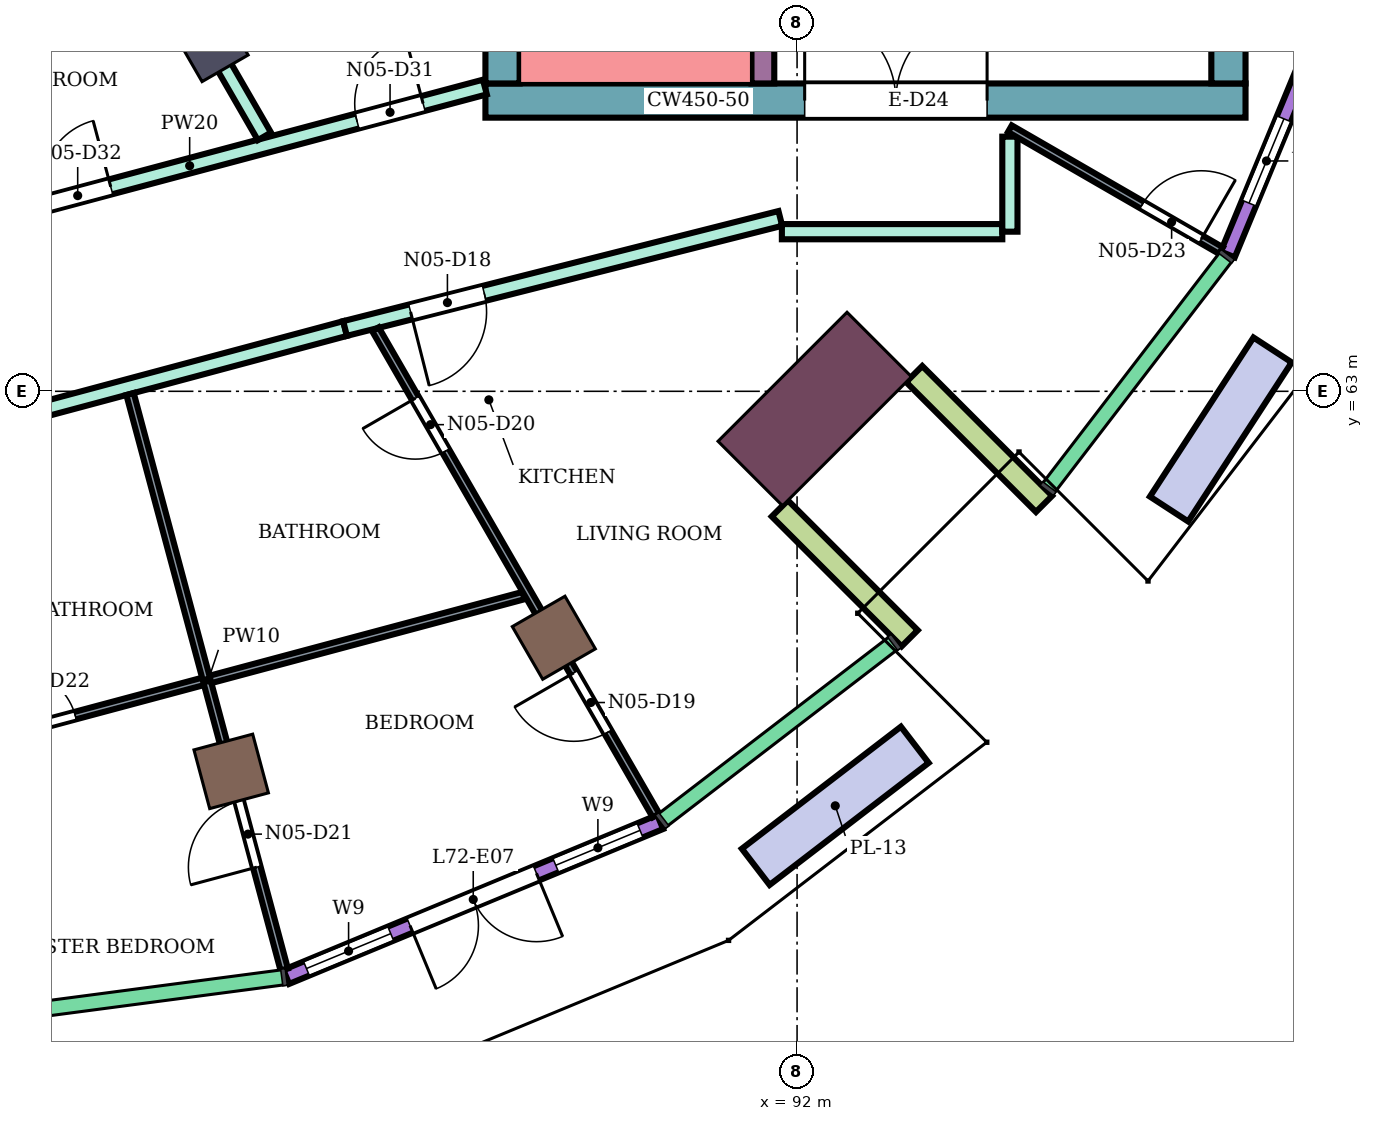
"""IFC4 building model, lengths in metres.
Left out: names, types, materials, properties, quantities, classifications, styles, units other than length and angle.
Written with IfcOpenShell. Run it as: python <this file> out.ifc"""

import sys

from ifc_helpers import new_model, si_unit, direction, frame, frame_2d, origin, origin_2d, place, context, subcontext, project, spatial, rectangle, extrude, element, fill, save


model = new_model("IFC4")
c1 = context("Model", 3, precision=1e-05, world=origin(), true_north=direction((0.0, 1.0)))
c2 = subcontext(c1, "Body", "Model", "MODEL_VIEW")
j1 = project(units=[si_unit("LENGTHUNIT", "METRE"), si_unit("PLANEANGLEUNIT", "RADIAN")], contexts=[c1])
p1 = place(None, origin())
s1 = spatial("IfcSite", under=j1, at=p1, CompositionType="ELEMENT")
p2 = place(p1, origin())
s2 = spatial("IfcBuilding", under=s1, at=p2, CompositionType="ELEMENT")
p3 = place(p2, frame((0.0, 0.0, 314.9)))
s3 = spatial("IfcBuildingStorey", under=s2, at=p3, CompositionType="ELEMENT", Elevation=314.9)
for number, where, z_axis, x_axis in (
    (1, (84.555, 58.0, 0.0), (0.0, 0.0, 1.0), (0.259, -0.966, 0.0)),
    (2, (88.8, 59.758, 0.0), (0.0, 0.0, 1.0), (0.5, -0.866, 0.0)),
):
    element("IfcColumn", number, at=place(p3, frame(where, z_axis=z_axis, x_axis=x_axis)), inside=s3, PredefinedType="COLUMN", context=c2, shape_type="SweptSolid", body=[
        extrude(rectangle(XDim=0.8, YDim=0.8, at=origin_2d()), origin(), (0.0, 0.0, 1.0), 4.4),
    ])
p4 = place(p3, frame((84.3, 67.552, 0.0), z_axis=(0.0, 0.0, 1.0), x_axis=(0.5, -0.866025403784, 0.0)))
e3 = element("IfcColumn", 3, at=p4, inside=s3, PredefinedType="COLUMN", context=c2, shape_type="SweptSolid", body=[
    extrude(rectangle(XDim=0.7, YDim=0.7, at=origin_2d()), origin(), (0.0, 0.0, 1.0), 4.4),
])
p5 = place(p3, frame((92.233, 62.767, 0.0), z_axis=(0.0, 0.0, 1.0), x_axis=(0.707106781187, -0.707106781187, 0.0)))
e4 = element("IfcColumn", 4, at=p5, inside=s3, PredefinedType="COLUMN", context=c2, shape_type="SweptSolid", body=[
    extrude(rectangle(XDim=1.2, YDim=2.4, at=origin_2d()), origin(), (0.0, 0.0, 1.0), 4.4),
])
p6 = place(p3, frame((87.9, 66.825, 0.0), z_axis=(0.0, 0.0, 1.0), x_axis=(1.0, 0.0, 0.0)))
e5 = element("IfcWall", 5, at=p6, inside=s3, PredefinedType="SHEAR", context=c2, shape_type="SweptSolid", body=[
    extrude(rectangle(XDim=10.0, YDim=0.45, at=frame_2d((5.0, 0.0))), origin(), (0.0, 0.0, 1.0), 4.08),
])
p7 = place(p6, frame((4.2, 0.0, 0.0)))
e6 = element("IfcOpeningElement", 6, at=p7, cuts=e5, PredefinedType="OPENING", context=c2, shape_type="SweptSolid", body=[
    extrude(rectangle(XDim=2.4, YDim=2.4, at=frame_2d((1.2, 1.2))), frame((0.0, 0.235, 0.0), z_axis=(0.0, -1.0, 0.0), x_axis=(1.0, 0.0, 0.0)), (0.0, 0.0, 1.0), 0.47),
])
p8 = place(p3, frame((88.125, 67.05, 0.0), z_axis=(0.0, 0.0, 1.0), x_axis=(0.0, 1.0, 0.0)))
e7 = element("IfcWall", 7, at=p8, inside=s3, PredefinedType="SHEAR", context=c2, shape_type="SweptSolid", body=[
    extrude(rectangle(XDim=7.95, YDim=0.45, at=frame_2d((3.975, 0.0))), origin(), (0.0, 0.0, 1.0), 4.08),
])
p9 = place(p3, frame((97.675, 67.05, 0.0), z_axis=(0.0, 0.0, 1.0), x_axis=(0.0, 1.0, 0.0)))
e8 = element("IfcWall", 8, at=p9, inside=s3, PredefinedType="SHEAR", context=c2, shape_type="SweptSolid", body=[
    extrude(rectangle(XDim=3.7, YDim=0.45, at=frame_2d((1.85, 0.0))), origin(), (0.0, 0.0, 1.0), 4.08),
])
p10 = place(p3, frame((91.55, 67.05, 0.0), z_axis=(0.0, 0.0, 1.0), x_axis=(0.0, 1.0, 0.0)))
e9 = element("IfcWall", 9, at=p10, inside=s3, PredefinedType="SHEAR", context=c2, shape_type="SweptSolid", body=[
    extrude(rectangle(XDim=7.95, YDim=0.3, at=frame_2d((3.975, 0.0))), origin(), (0.0, 0.0, 1.0), 4.08),
])
p11 = place(p10, frame((0.6, 0.0, 0.0)))
e10 = element("IfcOpeningElement", 10, at=p11, cuts=e9, PredefinedType="OPENING", context=c2, shape_type="SweptSolid", body=[
    extrude(rectangle(XDim=0.9, YDim=2.1, at=frame_2d((0.45, 1.05))), frame((0.0, 0.16, 0.0), z_axis=(0.0, -1.0, 0.0), x_axis=(1.0, 0.0, 0.0)), (0.0, 0.0, 1.0), 0.32),
])
p12 = place(p3, frame((85.28, 55.296, 0.0), z_axis=(0.0, 0.0, 1.0), x_axis=(0.923876574156, 0.382690574388, 0.0)))
e11 = element("IfcWall", 11, at=p12, inside=s3, PredefinedType="NOTDEFINED", context=c2, shape_type="SweptSolid", body=[
    extrude(rectangle(XDim=5.325, YDim=0.2, at=frame_2d((2.663, 0.0))), origin(), (0.0, 0.0, 1.0), 4.4),
])
p13 = place(p12, frame((0.288, 0.0, 0.9)))
e12 = element("IfcOpeningElement", 12, at=p13, cuts=e11, PredefinedType="OPENING", context=c2, shape_type="SweptSolid", body=[
    extrude(rectangle(XDim=1.2, YDim=2.7, at=frame_2d((0.6, 1.35))), frame((0.0, 0.11, 0.0), z_axis=(0.0, -1.0, 0.0), x_axis=(1.0, 0.0, 0.0)), (0.0, 0.0, 1.0), 0.22),
])
p14 = place(p12, frame((1.763, 0.0, 0.0)))
e13 = element("IfcOpeningElement", 13, at=p14, cuts=e11, PredefinedType="OPENING", context=c2, shape_type="SweptSolid", body=[
    extrude(rectangle(XDim=1.8, YDim=2.7, at=frame_2d((0.9, 1.35))), frame((0.0, 0.11, 0.0), z_axis=(0.0, -1.0, 0.0), x_axis=(1.0, 0.0, 0.0)), (0.0, 0.0, 1.0), 0.22),
])
p15 = place(p12, frame((3.838, 0.0, 0.9)))
e14 = element("IfcOpeningElement", 14, at=p15, cuts=e11, PredefinedType="OPENING", context=c2, shape_type="SweptSolid", body=[
    extrude(rectangle(XDim=1.2, YDim=2.7, at=frame_2d((0.6, 1.35))), frame((0.0, 0.11, 0.0), z_axis=(0.0, -1.0, 0.0), x_axis=(1.0, 0.0, 0.0)), (0.0, 0.0, 1.0), 0.22),
])
p16 = place(p3, frame((97.666, 64.801, 0.0), z_axis=(0.0, 0.0, 1.0), x_axis=(0.382690574388, 0.923876574156, 0.0)))
e15 = element("IfcWall", 15, at=p16, inside=s3, PredefinedType="NOTDEFINED", context=c2, shape_type="SweptSolid", body=[
    extrude(rectangle(XDim=5.325, YDim=0.2, at=frame_2d((2.663, 0.0))), origin(), (0.0, 0.0, 1.0), 4.4),
])
p17 = place(p16, frame((0.731, 0.0, 0.9)))
e16 = element("IfcOpeningElement", 16, at=p17, cuts=e15, PredefinedType="OPENING", context=c2, shape_type="SweptSolid", body=[
    extrude(rectangle(XDim=1.2, YDim=2.7, at=frame_2d((0.6, 1.35))), frame((0.0, 0.11, 0.0), z_axis=(0.0, -1.0, 0.0), x_axis=(1.0, 0.0, 0.0)), (0.0, 0.0, 1.0), 0.22),
])
p18 = place(p16, frame((3.394, 0.0, 0.9)))
e17 = element("IfcOpeningElement", 17, at=p18, cuts=e15, PredefinedType="OPENING", context=c2, shape_type="SweptSolid", body=[
    extrude(rectangle(XDim=1.2, YDim=2.7, at=frame_2d((0.6, 1.35))), frame((0.0, 0.11, 0.0), z_axis=(0.0, -1.0, 0.0), x_axis=(1.0, 0.0, 0.0)), (0.0, 0.0, 1.0), 0.22),
])
for number, where, z_axis, x_axis in (
    (18, (91.773, 61.459, 0.0), (0.0, 0.0, 1.0), (0.707, -0.707, 0.0)),
    (19, (93.541, 63.227, 0.0), (0.0, 0.0, 1.0), (0.707, -0.707, 0.0)),
):
    element("IfcWall", number, at=place(p3, frame(where, z_axis=z_axis, x_axis=x_axis)), inside=s3, PredefinedType="NOTDEFINED", context=c2, shape_type="SweptSolid", body=[
        extrude(rectangle(XDim=2.416, YDim=0.3, at=frame_2d((1.208, 0.0))), origin(), (0.0, 0.0, 1.0), 4.4),
    ])
p19 = place(p3, frame((80.0, 67.396, 0.0), z_axis=(0.0, 0.0, 1.0), x_axis=(0.965933654434, 0.258789828301, 0.0)))
e20 = element("IfcWall", 20, at=p19, inside=s3, PredefinedType="NOTDEFINED", context=c2, shape_type="SweptSolid", body=[
    extrude(rectangle(XDim=3.936, YDim=0.2, at=frame_2d((1.968, 0.0))), origin(), (0.0, 0.0, 1.0), 4.4),
])
p20 = place(p19, frame((0.468, 0.0, 0.9)))
e21 = element("IfcOpeningElement", 21, at=p20, cuts=e20, PredefinedType="OPENING", context=c2, shape_type="SweptSolid", body=[
    extrude(rectangle(XDim=3.0, YDim=2.3, at=frame_2d((1.5, 1.15))), frame((0.0, 0.11, 0.0), z_axis=(0.0, -1.0, 0.0), x_axis=(1.0, 0.0, 0.0)), (0.0, 0.0, 1.0), 0.22),
])
p21 = place(p3, frame((91.456, 56.744, 0.0), z_axis=(0.0, 0.0, 1.0), x_axis=(0.793376894156, 0.608730731785, 0.0)))
e22 = element("IfcWall", 22, at=p21, inside=s3, PredefinedType="USERDEFINED", context=c2, shape_type="SweptSolid", body=[
    extrude(rectangle(XDim=2.638, YDim=0.6, at=frame_2d((1.319, 0.0))), origin(), (0.0, 0.0, 1.0), 0.6),
])
p22 = place(p3, frame((96.894, 61.451, 0.0), z_axis=(0.0, 0.0, 1.0), x_axis=(0.545551817612, 0.838077093292, 0.0)))
e23 = element("IfcWall", 23, at=p22, inside=s3, PredefinedType="USERDEFINED", context=c2, shape_type="SweptSolid", body=[
    extrude(rectangle(XDim=2.497, YDim=0.6, at=frame_2d((1.249, 0.0))), origin(), (0.0, 0.0, 1.0), 0.6),
])
p23 = place(p3, frame((80.125, 64.932, 0.0), z_axis=(0.0, 0.0, 1.0), x_axis=(0.966236955806, 0.257655089674, 0.0)))
e24 = element("IfcWall", 24, at=p23, inside=s3, PredefinedType="PARTITIONING", context=c2, shape_type="SweptSolid", body=[
    extrude(rectangle(XDim=8.039, YDim=0.2, at=frame_2d((4.02, 0.0))), origin(), (0.0, 0.0, 1.0), 3.95),
])
p24 = place(p23, frame((6.298, 0.0, 0.0)))
e25 = element("IfcOpeningElement", 25, at=p24, cuts=e24, PredefinedType="OPENING", context=c2, shape_type="SweptSolid", body=[
    extrude(rectangle(XDim=0.9, YDim=2.1, at=frame_2d((0.45, 1.05))), frame((0.0, 0.11, 0.0), z_axis=(0.0, -1.0, 0.0), x_axis=(1.0, 0.0, 0.0)), (0.0, 0.0, 1.0), 0.22),
])
p25 = place(p23, frame((2.045, 0.0, 0.0)))
e26 = element("IfcOpeningElement", 26, at=p25, cuts=e24, PredefinedType="OPENING", context=c2, shape_type="SweptSolid", body=[
    extrude(rectangle(XDim=0.9, YDim=2.1, at=frame_2d((0.45, 1.05))), frame((0.0, 0.11, 0.0), z_axis=(0.0, -1.0, 0.0), x_axis=(1.0, 0.0, 0.0)), (0.0, 0.0, 1.0), 0.22),
])
p26 = place(p3, frame((80.0, 62.204, 0.0), z_axis=(0.0, 0.0, 1.0), x_axis=(0.965938139786, 0.258773086132, 0.0)))
e27 = element("IfcWall", 27, at=p26, inside=s3, PredefinedType="PARTITIONING", context=c2, shape_type="SweptSolid", body=[
    extrude(rectangle(XDim=6.266, YDim=0.2, at=frame_2d((3.133, 0.0))), origin(), (0.0, 0.0, 1.0), 3.95),
])
p27 = place(p3, frame((83.85, 68.333, 0.0), z_axis=(0.0, 0.0, 1.0), x_axis=(0.500080019051, -0.865979199835, 0.0)))
e28 = element("IfcWall", 28, at=p27, inside=s3, PredefinedType="PARTITIONING", context=c2, shape_type="SweptSolid", body=[
    extrude(rectangle(XDim=2.285, YDim=0.2, at=frame_2d((1.143, 0.0))), origin(), (0.0, 0.0, 1.0), 3.95),
])
p28 = place(p3, frame((86.053, 63.826, 0.0), z_axis=(0.0, 0.0, 1.0), x_axis=(0.969480070232, 0.245170131586, 0.0)))
e29 = element("IfcWall", 29, at=p28, inside=s3, PredefinedType="PARTITIONING", context=c2, shape_type="SweptSolid", body=[
    extrude(rectangle(XDim=5.907, YDim=0.2, at=frame_2d((2.954, 0.0))), origin(), (0.0, 0.0, 1.0), 3.95),
])
p29 = place(p28, frame((0.889, 0.0, 0.0)))
e30 = element("IfcOpeningElement", 30, at=p29, cuts=e29, PredefinedType="OPENING", context=c2, shape_type="SweptSolid", body=[
    extrude(rectangle(XDim=1.0, YDim=2.1, at=frame_2d((0.5, 1.05))), frame((0.0, 0.11, 0.0), z_axis=(0.0, -1.0, 0.0), x_axis=(1.0, 0.0, 0.0)), (0.0, 0.0, 1.0), 0.22),
])
p30 = place(p3, frame((91.8, 65.1, 0.0), z_axis=(0.0, 0.0, 1.0), x_axis=(1.0, 0.0, 0.0)))
e31 = element("IfcWall", 31, at=p30, inside=s3, PredefinedType="PARTITIONING", context=c2, shape_type="SweptSolid", body=[
    extrude(rectangle(XDim=2.9, YDim=0.2, at=frame_2d((1.45, 0.0))), origin(), (0.0, 0.0, 1.0), 3.95),
])
p31 = place(p3, frame((94.8, 65.1, 0.0), z_axis=(0.0, 0.0, 1.0), x_axis=(0.0, 1.0, 0.0)))
e32 = element("IfcWall", 32, at=p31, inside=s3, PredefinedType="PARTITIONING", context=c2, shape_type="SweptSolid", body=[
    extrude(rectangle(XDim=1.25, YDim=0.2, at=frame_2d((0.625, 0.0))), origin(), (0.0, 0.0, 1.0), 3.95),
])
p32 = place(p3, frame((80.106, 58.092, 0.0), z_axis=(0.0, 0.0, 1.0), x_axis=(0.965971139599, 0.258649874274, 0.0)))
e33 = element("IfcWall", 33, at=p32, inside=s3, PredefinedType="PARTITIONING", context=c2, shape_type="SweptSolid", body=[
    extrude(rectangle(XDim=8.588, YDim=0.1, at=frame_2d((4.294, 0.0))), origin(), (0.0, 0.0, 1.0), 3.95),
])
p33 = place(p32, frame((1.682, 0.0, 0.0)))
e34 = element("IfcOpeningElement", 34, at=p33, cuts=e33, PredefinedType="OPENING", context=c2, shape_type="SweptSolid", body=[
    extrude(rectangle(XDim=0.8, YDim=2.1, at=frame_2d((0.4, 1.05))), frame((0.0, 0.06, 0.0), z_axis=(0.0, -1.0, 0.0), x_axis=(1.0, 0.0, 0.0)), (0.0, 0.0, 1.0), 0.12),
])
p34 = place(p3, frame((83.224, 62.964, 0.0), z_axis=(0.0, 0.0, 1.0), x_axis=(0.258779160476, -0.96593651246, 0.0)))
e35 = element("IfcWall", 35, at=p34, inside=s3, PredefinedType="PARTITIONING", context=c2, shape_type="SweptSolid", body=[
    extrude(rectangle(XDim=7.838, YDim=0.1, at=frame_2d((3.919, 0.0))), origin(), (0.0, 0.0, 1.0), 3.95),
])
p35 = place(p34, frame((5.544, 0.0, 0.0)))
e36 = element("IfcOpeningElement", 36, at=p35, cuts=e35, PredefinedType="OPENING", context=c2, shape_type="SweptSolid", body=[
    extrude(rectangle(XDim=0.9, YDim=2.1, at=frame_2d((0.45, 1.05))), frame((0.0, 0.06, 0.0), z_axis=(0.0, -1.0, 0.0), x_axis=(1.0, 0.0, 0.0)), (0.0, 0.0, 1.0), 0.12),
])
p36 = place(p3, frame((86.453, 63.817, 0.0), z_axis=(0.0, 0.0, 1.0), x_axis=(0.499822611913, -0.866127794624, 0.0)))
e37 = element("IfcWall", 37, at=p36, inside=s3, PredefinedType="PARTITIONING", context=c2, shape_type="SweptSolid", body=[
    extrude(rectangle(XDim=7.385, YDim=0.1, at=frame_2d((3.693, 0.0))), origin(), (0.0, 0.0, 1.0), 3.95),
])
p37 = place(p36, frame((5.22, 0.0, 0.0)))
e38 = element("IfcOpeningElement", 38, at=p37, cuts=e37, PredefinedType="OPENING", context=c2, shape_type="SweptSolid", body=[
    extrude(rectangle(XDim=0.9, YDim=2.1, at=frame_2d((0.45, 1.05))), frame((0.0, 0.06, 0.0), z_axis=(0.0, -1.0, 0.0), x_axis=(1.0, 0.0, 0.0)), (0.0, 0.0, 1.0), 0.12),
])
p38 = place(p36, frame((1.05, 0.0, 0.0)))
e39 = element("IfcOpeningElement", 39, at=p38, cuts=e37, PredefinedType="OPENING", context=c2, shape_type="SweptSolid", body=[
    extrude(rectangle(XDim=0.8, YDim=2.1, at=frame_2d((0.4, 1.05))), frame((0.0, 0.06, 0.0), z_axis=(0.0, -1.0, 0.0), x_axis=(1.0, 0.0, 0.0)), (0.0, 0.0, 1.0), 0.12),
])
p39 = place(p3, frame((94.8, 66.455, 0.0), z_axis=(0.0, 0.0, 1.0), x_axis=(0.866056279496, -0.499946517884, 0.0)))
e40 = element("IfcWall", 40, at=p39, inside=s3, PredefinedType="PARTITIONING", context=c2, shape_type="SweptSolid", body=[
    extrude(rectangle(XDim=3.207, YDim=0.1, at=frame_2d((1.604, 0.0))), origin(), (0.0, 0.0, 1.0), 3.95),
])
p40 = place(p39, frame((2.007, 0.0, 0.0)))
e41 = element("IfcOpeningElement", 41, at=p40, cuts=e40, PredefinedType="OPENING", context=c2, shape_type="SweptSolid", body=[
    extrude(rectangle(XDim=0.9, YDim=2.1, at=frame_2d((0.45, 1.05))), frame((0.0, 0.06, 0.0), z_axis=(0.0, -1.0, 0.0), x_axis=(1.0, 0.0, 0.0)), (0.0, 0.0, 1.0), 0.12),
])
p41 = place(p13, origin())
e42 = element("IfcWindow", 42, at=p41, inside=s3, PartitioningType="SINGLE_PANEL", PredefinedType="WINDOW", context=c2, shape_type="SweptSolid", body=[
    extrude(rectangle(XDim=1.2, YDim=2.7, at=frame_2d((0.6, 1.35))), frame((0.0, 0.03, 0.0), z_axis=(0.0, -1.0, 0.0), x_axis=(1.0, 0.0, 0.0)), (0.0, 0.0, 1.0), 0.06),
])
fill(e12, e42)
p42 = place(p14, frame((1.8, 0.0, 0.0), z_axis=(0.0, 0.0, 1.0), x_axis=(-1.0, 0.0, 0.0)))
e43 = element("IfcDoor", 43, at=p42, inside=s3, OperationType="DOUBLE_DOOR_SINGLE_SWING", PredefinedType="DOOR", context=c2, shape_type="SweptSolid", body=[
    extrude(rectangle(XDim=1.8, YDim=2.7, at=frame_2d((0.9, 1.35))), frame((0.0, 0.025, 0.0), z_axis=(0.0, -1.0, 0.0), x_axis=(1.0, 0.0, 0.0)), (0.0, 0.0, 1.0), 0.05),
])
fill(e13, e43)
p43 = place(p15, origin())
e44 = element("IfcWindow", 44, at=p43, inside=s3, PartitioningType="SINGLE_PANEL", PredefinedType="WINDOW", context=c2, shape_type="SweptSolid", body=[
    extrude(rectangle(XDim=1.2, YDim=2.7, at=frame_2d((0.6, 1.35))), frame((0.0, 0.03, 0.0), z_axis=(0.0, -1.0, 0.0), x_axis=(1.0, 0.0, 0.0)), (0.0, 0.0, 1.0), 0.06),
])
fill(e14, e44)
p44 = place(p17, origin())
e45 = element("IfcWindow", 45, at=p44, inside=s3, PartitioningType="SINGLE_PANEL", PredefinedType="WINDOW", context=c2, shape_type="SweptSolid", body=[
    extrude(rectangle(XDim=1.2, YDim=2.7, at=frame_2d((0.6, 1.35))), frame((0.0, 0.03, 0.0), z_axis=(0.0, -1.0, 0.0), x_axis=(1.0, 0.0, 0.0)), (0.0, 0.0, 1.0), 0.06),
])
fill(e16, e45)
p45 = place(p29, frame((1.0, 0.0, 0.0), z_axis=(0.0, 0.0, 1.0), x_axis=(-1.0, 0.0, 0.0)))
e46 = element("IfcDoor", 46, at=p45, inside=s3, OperationType="SINGLE_SWING_RIGHT", PredefinedType="DOOR", context=c2, shape_type="SweptSolid", body=[
    extrude(rectangle(XDim=1.0, YDim=2.1, at=frame_2d((0.5, 1.05))), frame((0.0, 0.025, 0.0), z_axis=(0.0, -1.0, 0.0), x_axis=(1.0, 0.0, 0.0)), (0.0, 0.0, 1.0), 0.05),
])
fill(e30, e46)
p46 = place(p37, frame((0.9, 0.0, 0.0), z_axis=(0.0, 0.0, 1.0), x_axis=(-1.0, 0.0, 0.0)))
e47 = element("IfcDoor", 47, at=p46, inside=s3, OperationType="SINGLE_SWING_RIGHT", PredefinedType="DOOR", context=c2, shape_type="SweptSolid", body=[
    extrude(rectangle(XDim=0.9, YDim=2.1, at=frame_2d((0.45, 1.05))), frame((0.0, 0.025, 0.0), z_axis=(0.0, -1.0, 0.0), x_axis=(1.0, 0.0, 0.0)), (0.0, 0.0, 1.0), 0.05),
])
fill(e38, e47)
p47 = place(p38, frame((0.8, 0.0, 0.0), z_axis=(0.0, 0.0, 1.0), x_axis=(-1.0, 0.0, 0.0)))
e48 = element("IfcDoor", 48, at=p47, inside=s3, OperationType="SINGLE_SWING_RIGHT", PredefinedType="DOOR", context=c2, shape_type="SweptSolid", body=[
    extrude(rectangle(XDim=0.8, YDim=2.1, at=frame_2d((0.4, 1.05))), frame((0.0, 0.025, 0.0), z_axis=(0.0, -1.0, 0.0), x_axis=(1.0, 0.0, 0.0)), (0.0, 0.0, 1.0), 0.05),
])
fill(e39, e48)
p48 = place(p35, frame((0.9, 0.0, 0.0), z_axis=(0.0, 0.0, 1.0), x_axis=(-1.0, 0.0, 0.0)))
e49 = element("IfcDoor", 49, at=p48, inside=s3, OperationType="SINGLE_SWING_LEFT", PredefinedType="DOOR", context=c2, shape_type="SweptSolid", body=[
    extrude(rectangle(XDim=0.9, YDim=2.1, at=frame_2d((0.45, 1.05))), frame((0.0, 0.025, 0.0), z_axis=(0.0, -1.0, 0.0), x_axis=(1.0, 0.0, 0.0)), (0.0, 0.0, 1.0), 0.05),
])
fill(e36, e49)
p49 = place(p33, origin())
e50 = element("IfcDoor", 50, at=p49, inside=s3, OperationType="SINGLE_SWING_LEFT", PredefinedType="DOOR", context=c2, shape_type="SweptSolid", body=[
    extrude(rectangle(XDim=0.8, YDim=2.1, at=frame_2d((0.4, 1.05))), frame((0.0, 0.025, 0.0), z_axis=(0.0, -1.0, 0.0), x_axis=(1.0, 0.0, 0.0)), (0.0, 0.0, 1.0), 0.05),
])
fill(e34, e50)
p50 = place(p40, origin())
e51 = element("IfcDoor", 51, at=p50, inside=s3, OperationType="SINGLE_SWING_RIGHT", PredefinedType="DOOR", context=c2, shape_type="SweptSolid", body=[
    extrude(rectangle(XDim=0.9, YDim=2.1, at=frame_2d((0.45, 1.05))), frame((0.0, 0.025, 0.0), z_axis=(0.0, -1.0, 0.0), x_axis=(1.0, 0.0, 0.0)), (0.0, 0.0, 1.0), 0.05),
])
fill(e41, e51)
p51 = place(p24, origin())
e52 = element("IfcDoor", 52, at=p51, inside=s3, OperationType="SINGLE_SWING_RIGHT", PredefinedType="DOOR", context=c2, shape_type="SweptSolid", body=[
    extrude(rectangle(XDim=0.9, YDim=2.1, at=frame_2d((0.45, 1.05))), frame((0.0, 0.025, 0.0), z_axis=(0.0, -1.0, 0.0), x_axis=(1.0, 0.0, 0.0)), (0.0, 0.0, 1.0), 0.05),
])
fill(e25, e52)
p52 = place(p25, origin())
e53 = element("IfcDoor", 53, at=p52, inside=s3, OperationType="SINGLE_SWING_RIGHT", PredefinedType="DOOR", context=c2, shape_type="SweptSolid", body=[
    extrude(rectangle(XDim=0.9, YDim=2.1, at=frame_2d((0.45, 1.05))), frame((0.0, 0.025, 0.0), z_axis=(0.0, -1.0, 0.0), x_axis=(1.0, 0.0, 0.0)), (0.0, 0.0, 1.0), 0.05),
])
fill(e26, e53)
p53 = place(p7, origin())
e54 = element("IfcDoor", 54, at=p53, inside=s3, OperationType="DOUBLE_DOOR_SINGLE_SWING", PredefinedType="DOOR", context=c2, shape_type="SweptSolid", body=[
    extrude(rectangle(XDim=2.4, YDim=2.4, at=frame_2d((1.2, 1.2))), frame((0.0, 0.025, 0.0), z_axis=(0.0, -1.0, 0.0), x_axis=(1.0, 0.0, 0.0)), (0.0, 0.0, 1.0), 0.05),
])
fill(e6, e54)
save(model, sys.argv[1])
